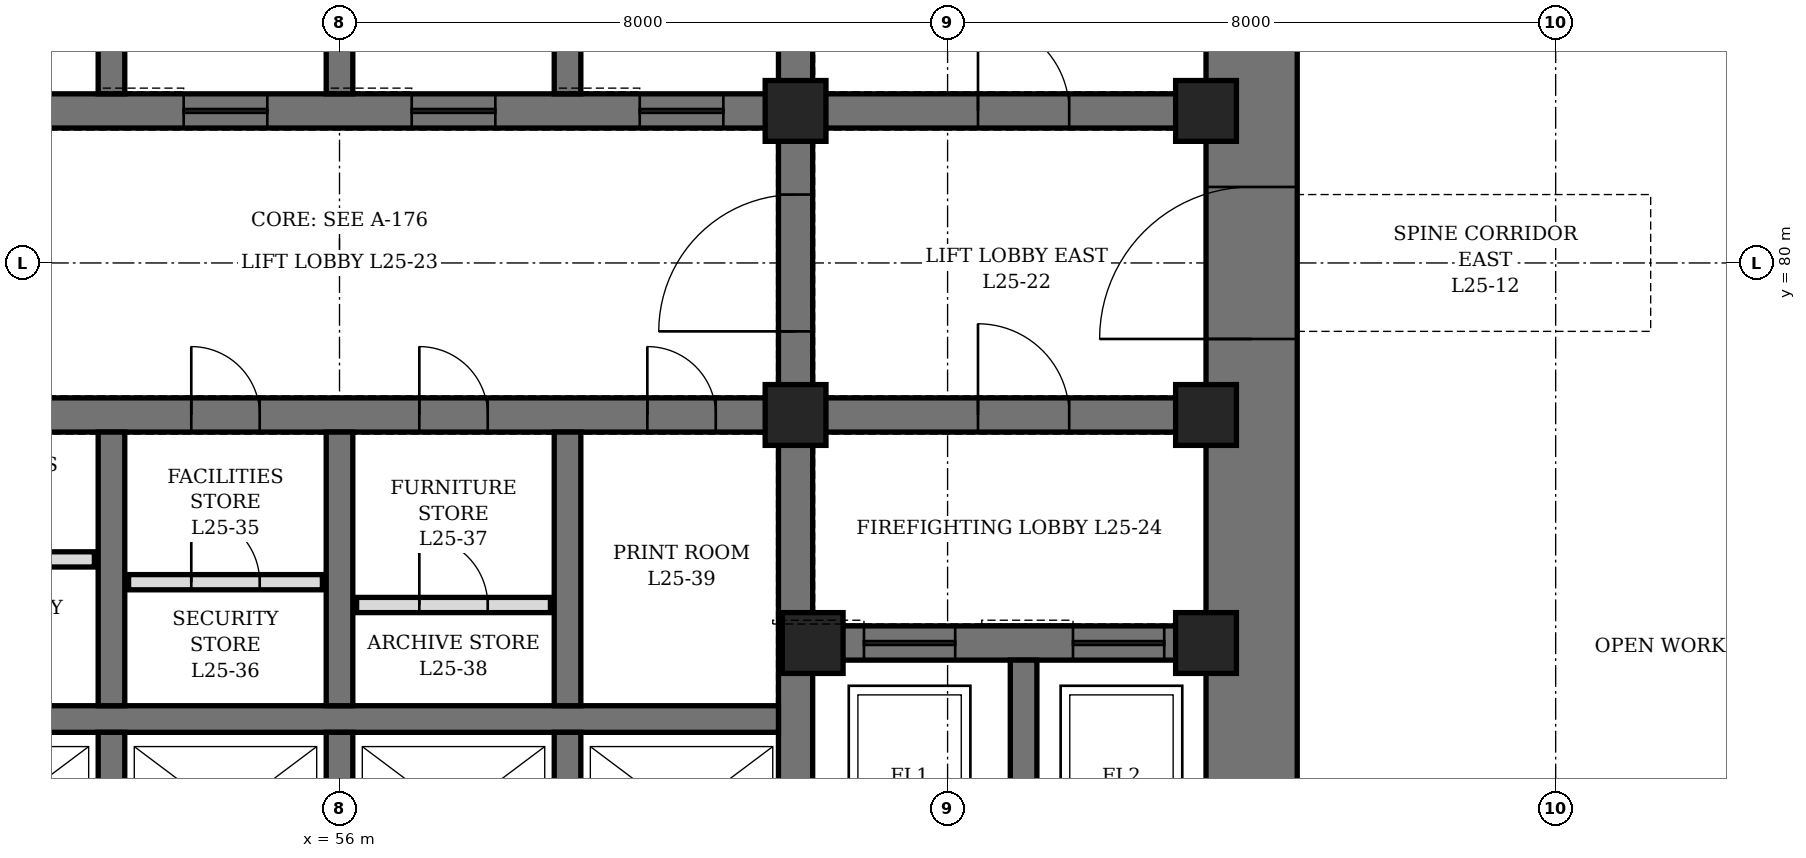
"""IFC4 building model, lengths in metres.
Left out: names, types, materials, properties, quantities, classifications, styles, units other than length and angle.
Written with IfcOpenShell. Run it as: python <this file> out.ifc"""

import sys

from ifc_helpers import new_model, si_unit, direction, frame, frame_2d, origin, origin_2d, place, context, subcontext, project, spatial, rectangle, hollow_rectangle, extrude, element, fill, save


model = new_model("IFC4")
c1 = context("Model", 3, precision=1e-05, world=origin(), true_north=direction((0.0, 1.0)))
c2 = subcontext(c1, "Body", "Model", "MODEL_VIEW")
j1 = project(units=[si_unit("LENGTHUNIT", "METRE"), si_unit("PLANEANGLEUNIT", "RADIAN")], contexts=[c1])
p1 = place(None, origin())
s1 = spatial("IfcSite", under=j1, at=p1, CompositionType="ELEMENT")
p2 = place(p1, origin())
s2 = spatial("IfcBuilding", under=s1, at=p2, CompositionType="ELEMENT")
p3 = place(p2, frame((0.0, 0.0, 116.5)))
s3 = spatial("IfcBuildingStorey", under=s2, at=p3, CompositionType="ELEMENT", Elevation=116.5)
p4 = place(p3, frame((68.0, 70.4, 0.0), z_axis=(0.0, 0.0, 1.0), x_axis=(0.0, 1.0, 0.0)))
e1 = element("IfcWall", 1, at=p4, inside=s3, PredefinedType="SHEAR", context=c2, shape_type="SweptSolid", body=[
    extrude(rectangle(XDim=19.2, YDim=1.2, at=frame_2d((9.6, 0.0))), origin(), (0.0, 0.0, 1.0), 4.2),
])
p5 = place(p4, frame((8.6, 0.0, 0.0)))
e2 = element("IfcOpeningElement", 2, at=p5, cuts=e1, PredefinedType="OPENING", context=c2, shape_type="SweptSolid", body=[
    extrude(rectangle(XDim=2.0, YDim=2.4, at=frame_2d((1.0, 1.2))), frame((0.0, 0.61, 0.0), z_axis=(0.0, -1.0, 0.0), x_axis=(1.0, 0.0, 0.0)), (0.0, 0.0, 1.0), 1.22),
])
p6 = place(p3, frame((62.0, 71.6, 0.0), z_axis=(0.0, 0.0, 1.0), x_axis=(0.0, 1.0, 0.0)))
e3 = element("IfcWall", 3, at=p6, inside=s3, PredefinedType="SHEAR", context=c2, shape_type="SweptSolid", body=[
    extrude(rectangle(XDim=16.8, YDim=0.45, at=frame_2d((8.4, 0.0))), origin(), (0.0, 0.0, 1.0), 4.2),
])
p7 = place(p6, frame((7.5, 0.0, 0.0)))
e4 = element("IfcOpeningElement", 4, at=p7, cuts=e3, PredefinedType="OPENING", context=c2, shape_type="SweptSolid", body=[
    extrude(rectangle(XDim=1.8, YDim=2.4, at=frame_2d((0.9, 1.2))), frame((0.0, 0.235, 0.0), z_axis=(0.0, -1.0, 0.0), x_axis=(1.0, 0.0, 0.0)), (0.0, 0.0, 1.0), 0.47),
])
p8 = place(p3, frame((62.225, 75.0, 0.0), z_axis=(0.0, 0.0, 1.0), x_axis=(1.0, 0.0, 0.0)))
e5 = element("IfcWall", 5, at=p8, inside=s3, PredefinedType="SHEAR", context=c2, shape_type="SweptSolid", body=[
    extrude(rectangle(XDim=5.175, YDim=0.45, at=frame_2d((2.587, 0.0))), origin(), (0.0, 0.0, 1.0), 4.2),
])
p9 = place(p8, frame((0.675, 0.0, 0.0)))
e6 = element("IfcOpeningElement", 6, at=p9, cuts=e5, PredefinedType="OPENING", context=c2, shape_type="SweptSolid", body=[
    extrude(rectangle(XDim=1.2, YDim=2.2, at=frame_2d((0.6, 1.1))), frame((0.0, 0.235, 0.0), z_axis=(0.0, -1.0, 0.0), x_axis=(1.0, 0.0, 0.0)), (0.0, 0.0, 1.0), 0.47),
])
p10 = place(p8, frame((3.425, 0.0, 0.0)))
e7 = element("IfcOpeningElement", 7, at=p10, cuts=e5, PredefinedType="OPENING", context=c2, shape_type="SweptSolid", body=[
    extrude(rectangle(XDim=1.2, YDim=2.2, at=frame_2d((0.6, 1.1))), frame((0.0, 0.235, 0.0), z_axis=(0.0, -1.0, 0.0), x_axis=(1.0, 0.0, 0.0)), (0.0, 0.0, 1.0), 0.47),
])
p11 = place(p3, frame((62.225, 78.0, 0.0), z_axis=(0.0, 0.0, 1.0), x_axis=(1.0, 0.0, 0.0)))
e8 = element("IfcWall", 8, at=p11, inside=s3, PredefinedType="SHEAR", context=c2, shape_type="SweptSolid", body=[
    extrude(rectangle(XDim=5.175, YDim=0.45, at=frame_2d((2.587, 0.0))), origin(), (0.0, 0.0, 1.0), 4.2),
])
p12 = place(p11, frame((2.175, 0.0, 0.0)))
e9 = element("IfcOpeningElement", 9, at=p12, cuts=e8, PredefinedType="OPENING", context=c2, shape_type="SweptSolid", body=[
    extrude(rectangle(XDim=1.2, YDim=2.1, at=frame_2d((0.6, 1.05))), frame((0.0, 0.235, 0.0), z_axis=(0.0, -1.0, 0.0), x_axis=(1.0, 0.0, 0.0)), (0.0, 0.0, 1.0), 0.47),
])
p13 = place(p3, frame((62.225, 82.0, 0.0), z_axis=(0.0, 0.0, 1.0), x_axis=(1.0, 0.0, 0.0)))
e10 = element("IfcWall", 10, at=p13, inside=s3, PredefinedType="SHEAR", context=c2, shape_type="SweptSolid", body=[
    extrude(rectangle(XDim=5.175, YDim=0.45, at=frame_2d((2.587, 0.0))), origin(), (0.0, 0.0, 1.0), 4.2),
])
p14 = place(p13, frame((2.175, 0.0, 0.0)))
e11 = element("IfcOpeningElement", 11, at=p14, cuts=e10, PredefinedType="OPENING", context=c2, shape_type="SweptSolid", body=[
    extrude(rectangle(XDim=1.2, YDim=2.1, at=frame_2d((0.6, 1.05))), frame((0.0, 0.235, 0.0), z_axis=(0.0, -1.0, 0.0), x_axis=(1.0, 0.0, 0.0)), (0.0, 0.0, 1.0), 0.47),
])
p15 = place(p3, frame((50.225, 78.0, 0.0), z_axis=(0.0, 0.0, 1.0), x_axis=(1.0, 0.0, 0.0)))
e12 = element("IfcWall", 12, at=p15, inside=s3, PredefinedType="SHEAR", context=c2, shape_type="SweptSolid", body=[
    extrude(rectangle(XDim=11.55, YDim=0.45, at=frame_2d((5.775, 0.0))), origin(), (0.0, 0.0, 1.0), 4.2),
])
p16 = place(p15, frame((0.825, 0.0, 0.0)))
e13 = element("IfcOpeningElement", 13, at=p16, cuts=e12, PredefinedType="OPENING", context=c2, shape_type="SweptSolid", body=[
    extrude(rectangle(XDim=0.9, YDim=2.1, at=frame_2d((0.45, 1.05))), frame((0.0, 0.235, 0.0), z_axis=(0.0, -1.0, 0.0), x_axis=(1.0, 0.0, 0.0)), (0.0, 0.0, 1.0), 0.47),
])
p17 = place(p15, frame((3.825, 0.0, 0.0)))
e14 = element("IfcOpeningElement", 14, at=p17, cuts=e12, PredefinedType="OPENING", context=c2, shape_type="SweptSolid", body=[
    extrude(rectangle(XDim=0.9, YDim=2.1, at=frame_2d((0.45, 1.05))), frame((0.0, 0.235, 0.0), z_axis=(0.0, -1.0, 0.0), x_axis=(1.0, 0.0, 0.0)), (0.0, 0.0, 1.0), 0.47),
])
p18 = place(p15, frame((6.825, 0.0, 0.0)))
e15 = element("IfcOpeningElement", 15, at=p18, cuts=e12, PredefinedType="OPENING", context=c2, shape_type="SweptSolid", body=[
    extrude(rectangle(XDim=0.9, YDim=2.1, at=frame_2d((0.45, 1.05))), frame((0.0, 0.235, 0.0), z_axis=(0.0, -1.0, 0.0), x_axis=(1.0, 0.0, 0.0)), (0.0, 0.0, 1.0), 0.47),
])
p19 = place(p15, frame((9.825, 0.0, 0.0)))
e16 = element("IfcOpeningElement", 16, at=p19, cuts=e12, PredefinedType="OPENING", context=c2, shape_type="SweptSolid", body=[
    extrude(rectangle(XDim=0.9, YDim=2.1, at=frame_2d((0.45, 1.05))), frame((0.0, 0.235, 0.0), z_axis=(0.0, -1.0, 0.0), x_axis=(1.0, 0.0, 0.0)), (0.0, 0.0, 1.0), 0.47),
])
p20 = place(p3, frame((50.225, 82.0, 0.0), z_axis=(0.0, 0.0, 1.0), x_axis=(1.0, 0.0, 0.0)))
e17 = element("IfcWall", 17, at=p20, inside=s3, PredefinedType="SHEAR", context=c2, shape_type="SweptSolid", body=[
    extrude(rectangle(XDim=11.55, YDim=0.45, at=frame_2d((5.775, 0.0))), origin(), (0.0, 0.0, 1.0), 4.2),
])
p21 = place(p20, frame((0.725, 0.0, 0.0)))
e18 = element("IfcOpeningElement", 18, at=p21, cuts=e17, PredefinedType="OPENING", context=c2, shape_type="SweptSolid", body=[
    extrude(rectangle(XDim=1.1, YDim=2.2, at=frame_2d((0.55, 1.1))), frame((0.0, 0.235, 0.0), z_axis=(0.0, -1.0, 0.0), x_axis=(1.0, 0.0, 0.0)), (0.0, 0.0, 1.0), 0.47),
])
p22 = place(p20, frame((3.725, 0.0, 0.0)))
e19 = element("IfcOpeningElement", 19, at=p22, cuts=e17, PredefinedType="OPENING", context=c2, shape_type="SweptSolid", body=[
    extrude(rectangle(XDim=1.1, YDim=2.2, at=frame_2d((0.55, 1.1))), frame((0.0, 0.235, 0.0), z_axis=(0.0, -1.0, 0.0), x_axis=(1.0, 0.0, 0.0)), (0.0, 0.0, 1.0), 0.47),
])
p23 = place(p20, frame((6.725, 0.0, 0.0)))
e20 = element("IfcOpeningElement", 20, at=p23, cuts=e17, PredefinedType="OPENING", context=c2, shape_type="SweptSolid", body=[
    extrude(rectangle(XDim=1.1, YDim=2.2, at=frame_2d((0.55, 1.1))), frame((0.0, 0.235, 0.0), z_axis=(0.0, -1.0, 0.0), x_axis=(1.0, 0.0, 0.0)), (0.0, 0.0, 1.0), 0.47),
])
p24 = place(p20, frame((9.725, 0.0, 0.0)))
e21 = element("IfcOpeningElement", 21, at=p24, cuts=e17, PredefinedType="OPENING", context=c2, shape_type="SweptSolid", body=[
    extrude(rectangle(XDim=1.1, YDim=2.2, at=frame_2d((0.55, 1.1))), frame((0.0, 0.235, 0.0), z_axis=(0.0, -1.0, 0.0), x_axis=(1.0, 0.0, 0.0)), (0.0, 0.0, 1.0), 0.47),
])
p25 = place(p3, frame((50.225, 74.0, 0.0), z_axis=(0.0, 0.0, 1.0), x_axis=(1.0, 0.0, 0.0)))
e22 = element("IfcWall", 22, at=p25, inside=s3, PredefinedType="SHEAR", context=c2, shape_type="SweptSolid", body=[
    extrude(rectangle(XDim=11.55, YDim=0.35, at=frame_2d((5.775, 0.0))), origin(), (0.0, 0.0, 1.0), 4.2),
])
p26 = place(p3, frame((53.0, 71.6, 0.0), z_axis=(0.0, 0.0, 1.0), x_axis=(0.0, 1.0, 0.0)))
e23 = element("IfcWall", 23, at=p26, inside=s3, PredefinedType="SHEAR", context=c2, shape_type="SweptSolid", body=[
    extrude(rectangle(XDim=2.225, YDim=0.35, at=frame_2d((1.112, 0.0))), origin(), (0.0, 0.0, 1.0), 4.2),
])
p27 = place(p3, frame((53.0, 74.175, 0.0), z_axis=(0.0, 0.0, 1.0), x_axis=(0.0, 1.0, 0.0)))
e24 = element("IfcWall", 24, at=p27, inside=s3, PredefinedType="SHEAR", context=c2, shape_type="SweptSolid", body=[
    extrude(rectangle(XDim=3.6, YDim=0.35, at=frame_2d((1.8, 0.0))), origin(), (0.0, 0.0, 1.0), 4.2),
])
p28 = place(p3, frame((53.0, 82.225, 0.0), z_axis=(0.0, 0.0, 1.0), x_axis=(0.0, 1.0, 0.0)))
e25 = element("IfcWall", 25, at=p28, inside=s3, PredefinedType="SHEAR", context=c2, shape_type="SweptSolid", body=[
    extrude(rectangle(XDim=3.55, YDim=0.35, at=frame_2d((1.775, 0.0))), origin(), (0.0, 0.0, 1.0), 4.2),
])
p29 = place(p3, frame((56.0, 71.6, 0.0), z_axis=(0.0, 0.0, 1.0), x_axis=(0.0, 1.0, 0.0)))
e26 = element("IfcWall", 26, at=p29, inside=s3, PredefinedType="SHEAR", context=c2, shape_type="SweptSolid", body=[
    extrude(rectangle(XDim=2.225, YDim=0.35, at=frame_2d((1.112, 0.0))), origin(), (0.0, 0.0, 1.0), 4.2),
])
p30 = place(p3, frame((56.0, 74.175, 0.0), z_axis=(0.0, 0.0, 1.0), x_axis=(0.0, 1.0, 0.0)))
e27 = element("IfcWall", 27, at=p30, inside=s3, PredefinedType="SHEAR", context=c2, shape_type="SweptSolid", body=[
    extrude(rectangle(XDim=3.6, YDim=0.35, at=frame_2d((1.8, 0.0))), origin(), (0.0, 0.0, 1.0), 4.2),
])
p31 = place(p3, frame((56.0, 82.225, 0.0), z_axis=(0.0, 0.0, 1.0), x_axis=(0.0, 1.0, 0.0)))
e28 = element("IfcWall", 28, at=p31, inside=s3, PredefinedType="SHEAR", context=c2, shape_type="SweptSolid", body=[
    extrude(rectangle(XDim=3.55, YDim=0.35, at=frame_2d((1.775, 0.0))), origin(), (0.0, 0.0, 1.0), 4.2),
])
p32 = place(p3, frame((59.0, 71.6, 0.0), z_axis=(0.0, 0.0, 1.0), x_axis=(0.0, 1.0, 0.0)))
e29 = element("IfcWall", 29, at=p32, inside=s3, PredefinedType="SHEAR", context=c2, shape_type="SweptSolid", body=[
    extrude(rectangle(XDim=2.225, YDim=0.35, at=frame_2d((1.112, 0.0))), origin(), (0.0, 0.0, 1.0), 4.2),
])
p33 = place(p3, frame((59.0, 74.175, 0.0), z_axis=(0.0, 0.0, 1.0), x_axis=(0.0, 1.0, 0.0)))
e30 = element("IfcWall", 30, at=p33, inside=s3, PredefinedType="SHEAR", context=c2, shape_type="SweptSolid", body=[
    extrude(rectangle(XDim=3.6, YDim=0.35, at=frame_2d((1.8, 0.0))), origin(), (0.0, 0.0, 1.0), 4.2),
])
p34 = place(p3, frame((59.0, 82.225, 0.0), z_axis=(0.0, 0.0, 1.0), x_axis=(0.0, 1.0, 0.0)))
e31 = element("IfcWall", 31, at=p34, inside=s3, PredefinedType="SHEAR", context=c2, shape_type="SweptSolid", body=[
    extrude(rectangle(XDim=3.55, YDim=0.35, at=frame_2d((1.775, 0.0))), origin(), (0.0, 0.0, 1.0), 4.2),
])
p35 = place(p3, frame((65.0, 71.6, 0.0), z_axis=(0.0, 0.0, 1.0), x_axis=(0.0, 1.0, 0.0)))
e32 = element("IfcWall", 32, at=p35, inside=s3, PredefinedType="SHEAR", context=c2, shape_type="SweptSolid", body=[
    extrude(rectangle(XDim=3.175, YDim=0.35, at=frame_2d((1.587, 0.0))), origin(), (0.0, 0.0, 1.0), 4.2),
])
for number, where, z_axis, x_axis in (
    (33, (62.0, 78.0, 0.0), (0.0, 0.0, 1.0), (1.0, 0.0, 0.0)),
    (34, (62.0, 82.0, 0.0), (0.0, 0.0, 1.0), (1.0, 0.0, 0.0)),
    (35, (62.225, 75.0, 0.0), (0.0, 0.0, 1.0), (1.0, 0.0, 0.0)),
    (36, (67.4, 75.0, 0.0), (0.0, 0.0, 1.0), (1.0, 0.0, 0.0)),
    (37, (67.4, 78.0, 0.0), (0.0, 0.0, 1.0), (1.0, 0.0, 0.0)),
    (38, (67.4, 82.0, 0.0), (0.0, 0.0, 1.0), (1.0, 0.0, 0.0)),
):
    element("IfcColumn", number, at=place(p3, frame(where, z_axis=z_axis, x_axis=x_axis)), inside=s3, PredefinedType="COLUMN", context=c2, shape_type="SweptSolid", body=[
        extrude(hollow_rectangle(XDim=0.8, YDim=0.8, WallThickness=0.1, at=origin_2d()), origin(), (0.0, 0.0, 1.0), 4.2),
    ])
p36 = place(p3, frame((50.225, 76.1, 0.0), z_axis=(0.0, 0.0, 1.0), x_axis=(1.0, 0.0, 0.0)))
e39 = element("IfcWall", 39, at=p36, inside=s3, PredefinedType="PARTITIONING", context=c2, shape_type="SweptSolid", body=[
    extrude(rectangle(XDim=2.55, YDim=0.2, at=frame_2d((1.275, 0.0))), origin(), (0.0, 0.0, 1.0), 4.04),
])
p37 = place(p36, frame((0.825, 0.0, 0.0)))
e40 = element("IfcOpeningElement", 40, at=p37, cuts=e39, PredefinedType="OPENING", context=c2, shape_type="SweptSolid", body=[
    extrude(rectangle(XDim=0.9, YDim=2.1, at=frame_2d((0.45, 1.05))), frame((0.0, 0.11, 0.0), z_axis=(0.0, -1.0, 0.0), x_axis=(1.0, 0.0, 0.0)), (0.0, 0.0, 1.0), 0.22),
])
p38 = place(p3, frame((53.225, 75.8, 0.0), z_axis=(0.0, 0.0, 1.0), x_axis=(1.0, 0.0, 0.0)))
e41 = element("IfcWall", 41, at=p38, inside=s3, PredefinedType="PARTITIONING", context=c2, shape_type="SweptSolid", body=[
    extrude(rectangle(XDim=2.55, YDim=0.2, at=frame_2d((1.275, 0.0))), origin(), (0.0, 0.0, 1.0), 4.04),
])
p39 = place(p38, frame((0.825, 0.0, 0.0)))
e42 = element("IfcOpeningElement", 42, at=p39, cuts=e41, PredefinedType="OPENING", context=c2, shape_type="SweptSolid", body=[
    extrude(rectangle(XDim=0.9, YDim=2.1, at=frame_2d((0.45, 1.05))), frame((0.0, 0.11, 0.0), z_axis=(0.0, -1.0, 0.0), x_axis=(1.0, 0.0, 0.0)), (0.0, 0.0, 1.0), 0.22),
])
p40 = place(p3, frame((56.225, 75.5, 0.0), z_axis=(0.0, 0.0, 1.0), x_axis=(1.0, 0.0, 0.0)))
e43 = element("IfcWall", 43, at=p40, inside=s3, PredefinedType="PARTITIONING", context=c2, shape_type="SweptSolid", body=[
    extrude(rectangle(XDim=2.55, YDim=0.2, at=frame_2d((1.275, 0.0))), origin(), (0.0, 0.0, 1.0), 4.04),
])
p41 = place(p40, frame((0.825, 0.0, 0.0)))
e44 = element("IfcOpeningElement", 44, at=p41, cuts=e43, PredefinedType="OPENING", context=c2, shape_type="SweptSolid", body=[
    extrude(rectangle(XDim=0.9, YDim=2.1, at=frame_2d((0.45, 1.05))), frame((0.0, 0.11, 0.0), z_axis=(0.0, -1.0, 0.0), x_axis=(1.0, 0.0, 0.0)), (0.0, 0.0, 1.0), 0.22),
])
p42 = place(p17, origin())
e45 = element("IfcDoor", 45, at=p42, inside=s3, OperationType="SINGLE_SWING_LEFT", PredefinedType="DOOR", context=c2, shape_type="SweptSolid", body=[
    extrude(rectangle(XDim=0.9, YDim=2.1, at=frame_2d((0.45, 1.05))), frame((0.0, 0.225, 0.0), z_axis=(0.0, -1.0, 0.0), x_axis=(1.0, 0.0, 0.0)), (0.0, 0.0, 1.0), 0.449),
])
fill(e14, e45)
p43 = place(p39, origin())
e46 = element("IfcDoor", 46, at=p43, inside=s3, OperationType="SINGLE_SWING_LEFT", PredefinedType="DOOR", context=c2, shape_type="SweptSolid", body=[
    extrude(rectangle(XDim=0.9, YDim=2.1, at=frame_2d((0.45, 1.05))), frame((0.0, 0.1, 0.0), z_axis=(0.0, -1.0, 0.0), x_axis=(1.0, 0.0, 0.0)), (0.0, 0.0, 1.0), 0.199),
])
fill(e42, e46)
p44 = place(p18, origin())
e47 = element("IfcDoor", 47, at=p44, inside=s3, OperationType="SINGLE_SWING_LEFT", PredefinedType="DOOR", context=c2, shape_type="SweptSolid", body=[
    extrude(rectangle(XDim=0.9, YDim=2.1, at=frame_2d((0.45, 1.05))), frame((0.0, 0.225, 0.0), z_axis=(0.0, -1.0, 0.0), x_axis=(1.0, 0.0, 0.0)), (0.0, 0.0, 1.0), 0.449),
])
fill(e15, e47)
p45 = place(p41, origin())
e48 = element("IfcDoor", 48, at=p45, inside=s3, OperationType="SINGLE_SWING_LEFT", PredefinedType="DOOR", context=c2, shape_type="SweptSolid", body=[
    extrude(rectangle(XDim=0.9, YDim=2.1, at=frame_2d((0.45, 1.05))), frame((0.0, 0.1, 0.0), z_axis=(0.0, -1.0, 0.0), x_axis=(1.0, 0.0, 0.0)), (0.0, 0.0, 1.0), 0.199),
])
fill(e44, e48)
p46 = place(p19, origin())
e49 = element("IfcDoor", 49, at=p46, inside=s3, OperationType="SINGLE_SWING_LEFT", PredefinedType="DOOR", context=c2, shape_type="SweptSolid", body=[
    extrude(rectangle(XDim=0.9, YDim=2.1, at=frame_2d((0.45, 1.05))), frame((0.0, 0.225, 0.0), z_axis=(0.0, -1.0, 0.0), x_axis=(1.0, 0.0, 0.0)), (0.0, 0.0, 1.0), 0.449),
])
fill(e16, e49)
p47 = place(p14, origin())
e50 = element("IfcDoor", 50, at=p47, inside=s3, OperationType="SINGLE_SWING_LEFT", PredefinedType="DOOR", context=c2, shape_type="SweptSolid", body=[
    extrude(rectangle(XDim=1.2, YDim=2.1, at=frame_2d((0.6, 1.05))), frame((0.0, 0.225, 0.0), z_axis=(0.0, -1.0, 0.0), x_axis=(1.0, 0.0, 0.0)), (0.0, 0.0, 1.0), 0.449),
])
fill(e11, e50)
p48 = place(p5, origin())
e51 = element("IfcDoor", 51, at=p48, inside=s3, OperationType="DOUBLE_DOOR_SINGLE_SWING", PredefinedType="DOOR", context=c2, shape_type="SweptSolid", body=[
    extrude(rectangle(XDim=2.0, YDim=2.4, at=frame_2d((1.0, 1.2))), frame((0.0, 0.35, 0.0), z_axis=(0.0, -1.0, 0.0), x_axis=(1.0, 0.0, 0.0)), (0.0, 0.0, 1.0), 0.7),
])
fill(e2, e51)
p49 = place(p7, origin())
e52 = element("IfcDoor", 52, at=p49, inside=s3, OperationType="DOUBLE_DOOR_SINGLE_SWING", PredefinedType="DOOR", context=c2, shape_type="SweptSolid", body=[
    extrude(rectangle(XDim=1.8, YDim=2.4, at=frame_2d((0.9, 1.2))), frame((0.0, 0.225, 0.0), z_axis=(0.0, -1.0, 0.0), x_axis=(1.0, 0.0, 0.0)), (0.0, 0.0, 1.0), 0.449),
])
fill(e4, e52)
p50 = place(p12, origin())
e53 = element("IfcDoor", 53, at=p50, inside=s3, OperationType="SINGLE_SWING_RIGHT", PredefinedType="DOOR", context=c2, shape_type="SweptSolid", body=[
    extrude(rectangle(XDim=1.2, YDim=2.1, at=frame_2d((0.6, 1.05))), frame((0.0, 0.225, 0.0), z_axis=(0.0, -1.0, 0.0), x_axis=(1.0, 0.0, 0.0)), (0.0, 0.0, 1.0), 0.449),
])
fill(e9, e53)
p51 = place(p22, origin())
e54 = element("IfcDoor", 54, at=p51, inside=s3, OperationType="SLIDING_TO_LEFT", PredefinedType="DOOR", context=c2, shape_type="SweptSolid", body=[
    extrude(rectangle(XDim=1.1, YDim=2.2, at=frame_2d((0.55, 1.1))), frame((0.0, 0.225, 0.0), z_axis=(0.0, -1.0, 0.0), x_axis=(1.0, 0.0, 0.0)), (0.0, 0.0, 1.0), 0.449),
])
fill(e19, e54)
p52 = place(p23, origin())
e55 = element("IfcDoor", 55, at=p52, inside=s3, OperationType="SLIDING_TO_LEFT", PredefinedType="DOOR", context=c2, shape_type="SweptSolid", body=[
    extrude(rectangle(XDim=1.1, YDim=2.2, at=frame_2d((0.55, 1.1))), frame((0.0, 0.225, 0.0), z_axis=(0.0, -1.0, 0.0), x_axis=(1.0, 0.0, 0.0)), (0.0, 0.0, 1.0), 0.449),
])
fill(e20, e55)
p53 = place(p24, origin())
e56 = element("IfcDoor", 56, at=p53, inside=s3, OperationType="SLIDING_TO_LEFT", PredefinedType="DOOR", context=c2, shape_type="SweptSolid", body=[
    extrude(rectangle(XDim=1.1, YDim=2.2, at=frame_2d((0.55, 1.1))), frame((0.0, 0.225, 0.0), z_axis=(0.0, -1.0, 0.0), x_axis=(1.0, 0.0, 0.0)), (0.0, 0.0, 1.0), 0.449),
])
fill(e21, e56)
p54 = place(p9, origin())
e57 = element("IfcDoor", 57, at=p54, inside=s3, OperationType="SLIDING_TO_LEFT", PredefinedType="DOOR", context=c2, shape_type="SweptSolid", body=[
    extrude(rectangle(XDim=1.2, YDim=2.2, at=frame_2d((0.6, 1.1))), frame((0.0, 0.225, 0.0), z_axis=(0.0, -1.0, 0.0), x_axis=(1.0, 0.0, 0.0)), (0.0, 0.0, 1.0), 0.449),
])
fill(e6, e57)
p55 = place(p10, origin())
e58 = element("IfcDoor", 58, at=p55, inside=s3, OperationType="SLIDING_TO_LEFT", PredefinedType="DOOR", context=c2, shape_type="SweptSolid", body=[
    extrude(rectangle(XDim=1.2, YDim=2.2, at=frame_2d((0.6, 1.1))), frame((0.0, 0.225, 0.0), z_axis=(0.0, -1.0, 0.0), x_axis=(1.0, 0.0, 0.0)), (0.0, 0.0, 1.0), 0.449),
])
fill(e7, e58)
save(model, sys.argv[1])
